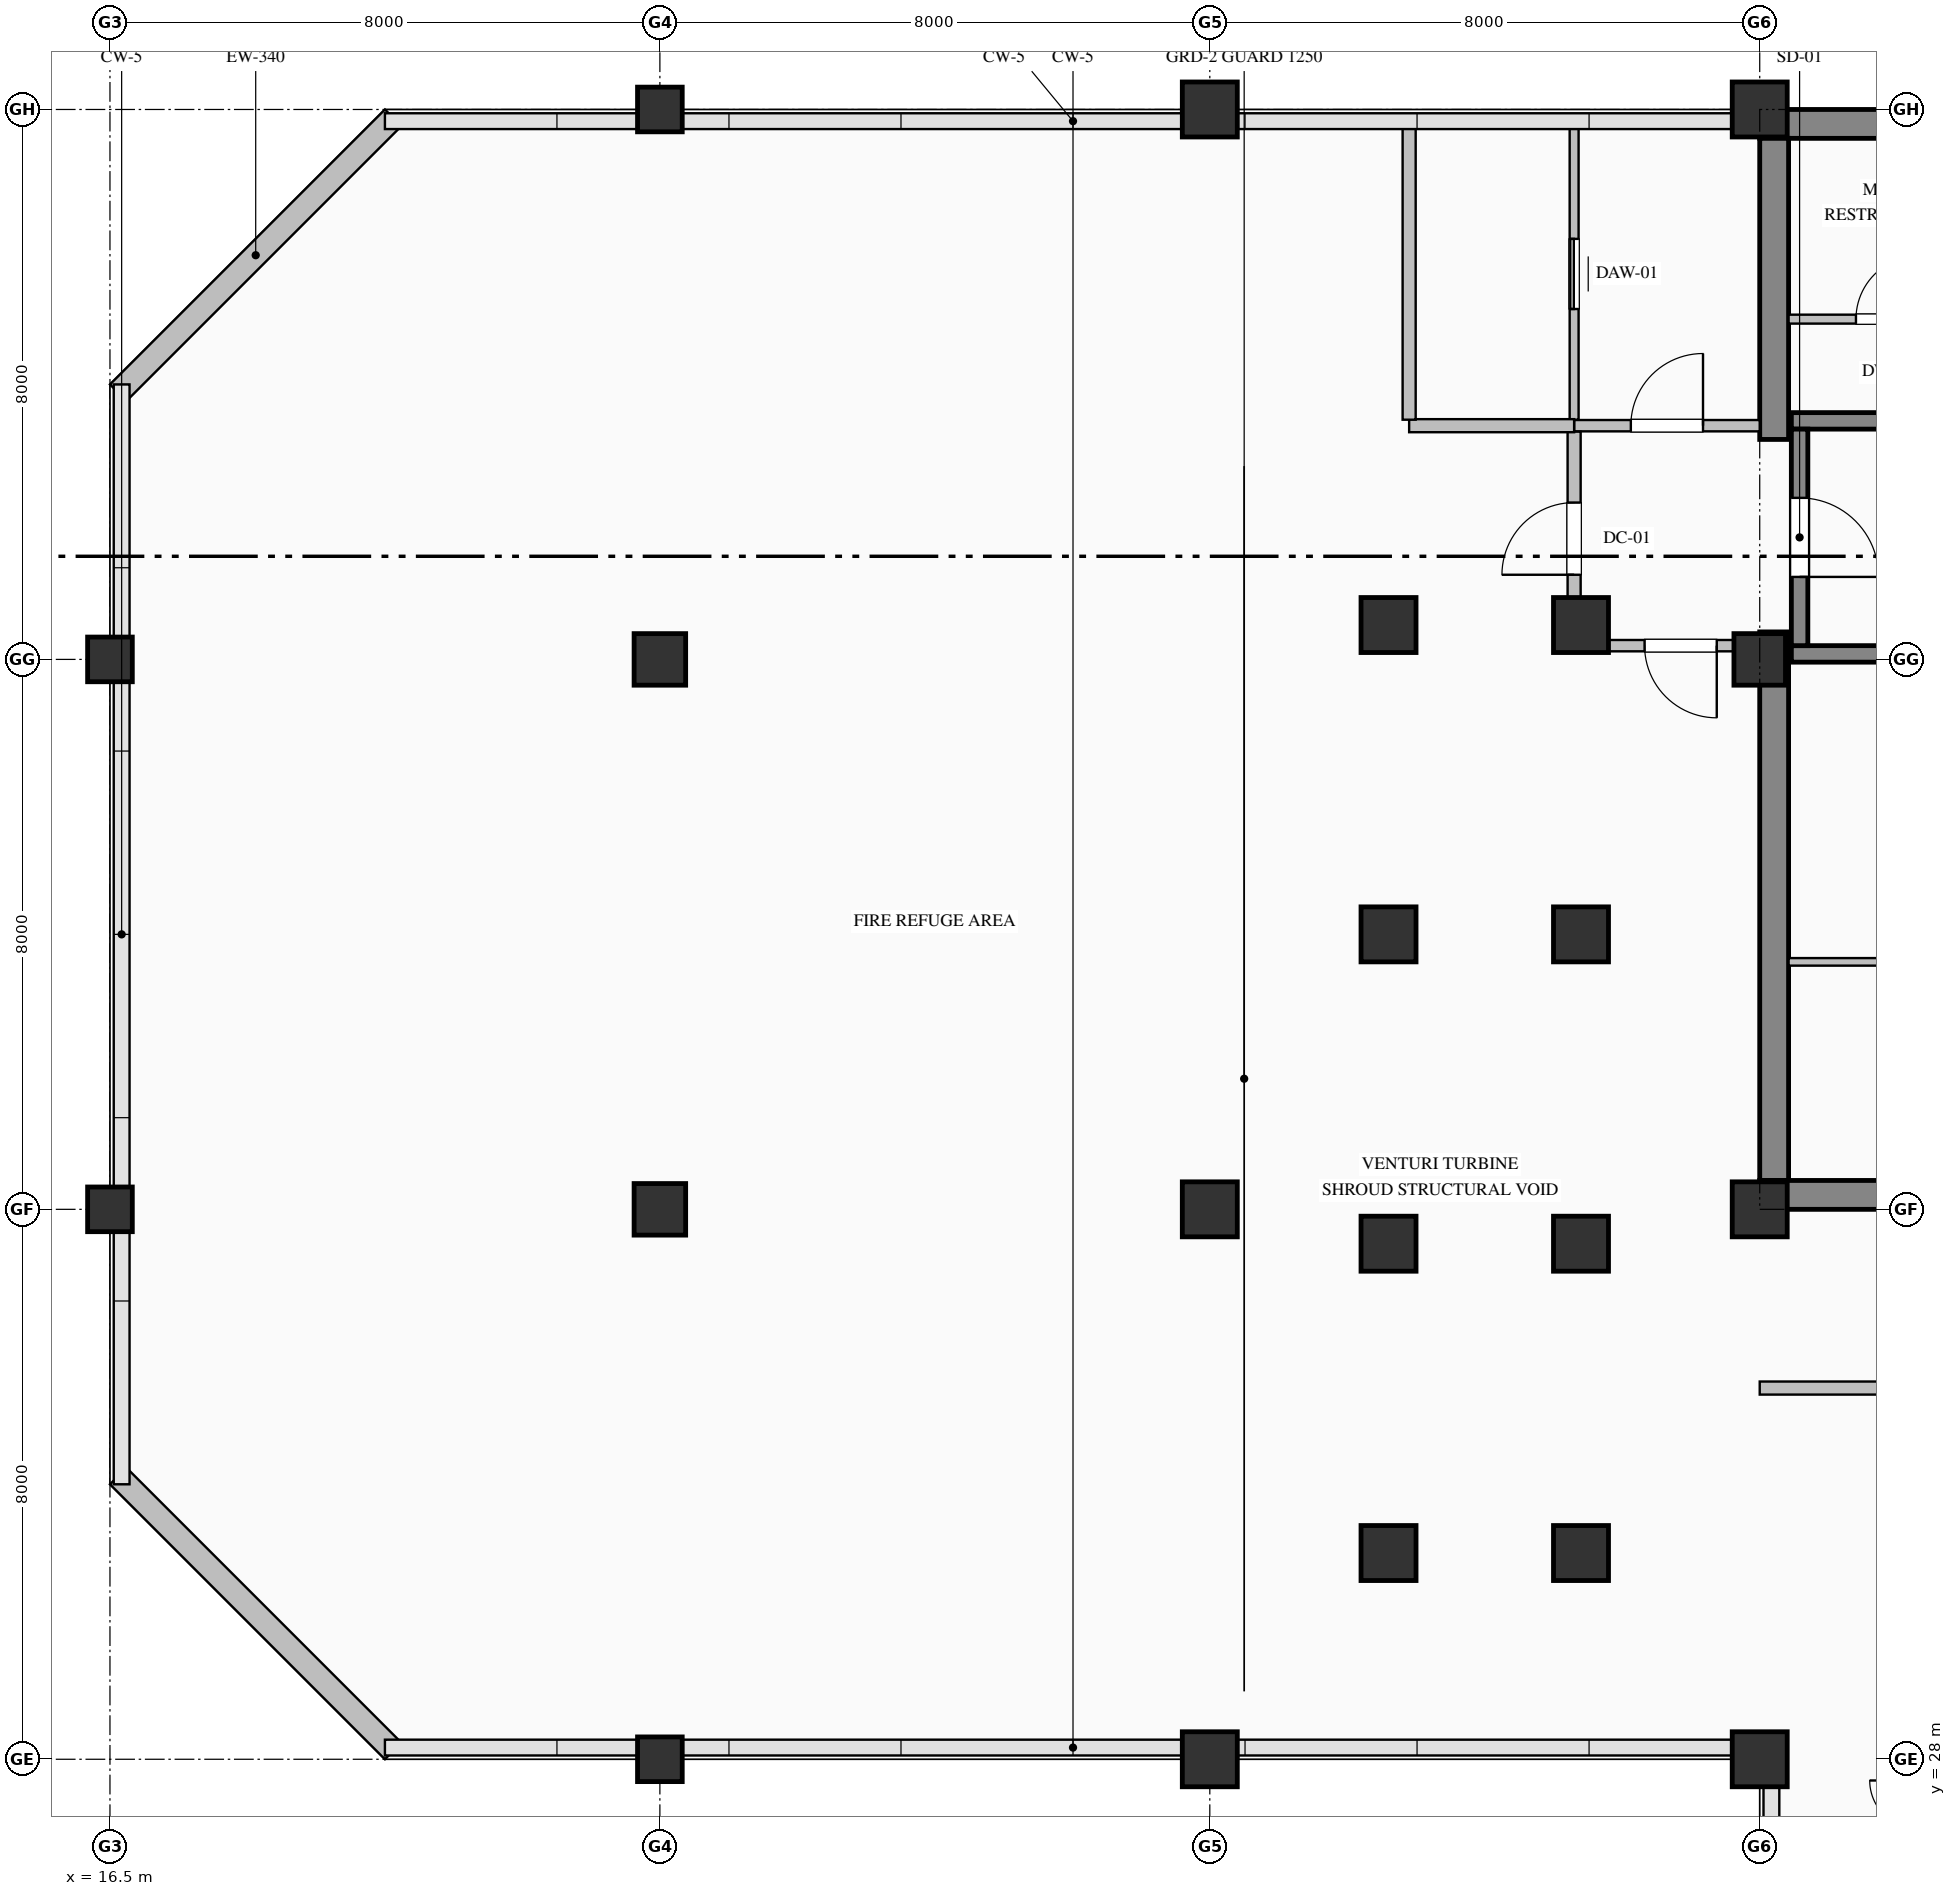
"""IFC4 building model, lengths in metres.
Left out: names, types, materials, properties, quantities, classifications, styles, units other than length and angle.
Written with IfcOpenShell. Run it as: python <this file> out.ifc"""

import sys

from ifc_helpers import new_model, si_unit, direction, frame, frame_2d, origin, origin_2d, place, context, subcontext, project, spatial, rectangle, hollow_rectangle, hollow_circle, extrude, element, fill, save


model = new_model("IFC4")
c1 = context("Model", 3, precision=1e-05, world=origin(), true_north=direction((0.0, 1.0)))
c2 = subcontext(c1, "Body", "Model", "MODEL_VIEW")
j1 = project(units=[si_unit("LENGTHUNIT", "METRE"), si_unit("PLANEANGLEUNIT", "RADIAN")], contexts=[c1])
p1 = place(None, origin())
s1 = spatial("IfcSite", under=j1, at=p1, CompositionType="ELEMENT")
p2 = place(p1, origin())
s2 = spatial("IfcBuilding", under=s1, at=p2, CompositionType="ELEMENT")
p3 = place(p2, frame((0.0, 0.0, 367.2)))
s3 = spatial("IfcBuildingStorey", under=s2, at=p3, CompositionType="ELEMENT", Elevation=367.2)
p4 = place(p3, frame((40.5, 51.79, 0.0), z_axis=(0.0, 0.0, 1.0), x_axis=(1.0, 0.0, 0.0)))
e1 = element("IfcWall", 1, at=p4, inside=s3, PredefinedType="SHEAR", context=c2, shape_type="SweptSolid", body=[
    extrude(rectangle(XDim=23.5, YDim=0.42, at=frame_2d((11.75, 0.0))), origin(), (0.0, 0.0, 1.0), 5.39),
])
p5 = place(p3, frame((40.71, 36.42, 0.0), z_axis=(0.0, 0.0, 1.0), x_axis=(0.0, 1.0, 0.0)))
e2 = element("IfcWall", 2, at=p5, inside=s3, PredefinedType="SHEAR", context=c2, shape_type="SweptSolid", body=[
    extrude(rectangle(XDim=7.98, YDim=0.42, at=frame_2d((3.99, 0.0))), origin(), (0.0, 0.0, 1.0), 5.39),
])
p6 = place(p3, frame((40.71, 47.2, 0.0), z_axis=(0.0, 0.0, 1.0), x_axis=(0.0, 1.0, 0.0)))
e3 = element("IfcWall", 3, at=p6, inside=s3, PredefinedType="SHEAR", context=c2, shape_type="SweptSolid", body=[
    extrude(rectangle(XDim=4.38, YDim=0.42, at=frame_2d((2.19, 0.0))), origin(), (0.0, 0.0, 1.0), 5.39),
])
p7 = place(p3, frame((40.5, 36.21, 0.0), z_axis=(0.0, 0.0, 1.0), x_axis=(1.0, 0.0, 0.0)))
e4 = element("IfcWall", 4, at=p7, inside=s3, PredefinedType="SHEAR", context=c2, shape_type="SweptSolid", body=[
    extrude(rectangle(XDim=9.1, YDim=0.42, at=frame_2d((4.55, 0.0))), origin(), (0.0, 0.0, 1.0), 5.39),
])
for number, where, z_axis, x_axis in (
    (5, (16.5, 36.0, 0.0), (0.0, 0.0, 1.0), (1.0, 0.0, 0.0)),
    (6, (16.5, 44.0, 0.0), (0.0, 0.0, 1.0), (1.0, 0.0, 0.0)),
    (7, (24.5, 28.0, 0.0), (0.0, 0.0, 1.0), (1.0, 0.0, 0.0)),
):
    element("IfcColumn", number, at=place(p3, frame(where, z_axis=z_axis, x_axis=x_axis)), inside=s3, PredefinedType="COLUMN", context=c2, shape_type="SweptSolid", body=[
        extrude(hollow_rectangle(XDim=0.65, YDim=0.65, WallThickness=0.028, at=origin_2d()), origin(), (0.0, 0.0, 1.0), 5.8),
    ])
for number, where, z_axis, x_axis in (
    (8, (24.5, 36.0, 0.0), (0.0, 0.0, 1.0), (1.0, 0.0, 0.0)),
    (9, (24.5, 44.0, 0.0), (0.0, 0.0, 1.0), (1.0, 0.0, 0.0)),
):
    element("IfcColumn", number, at=place(p3, frame(where, z_axis=z_axis, x_axis=x_axis)), inside=s3, PredefinedType="COLUMN", context=c2, shape_type="SweptSolid", body=[
        extrude(rectangle(XDim=0.75, YDim=0.75, at=origin_2d()), origin(), (0.0, 0.0, 1.0), 5.8),
    ])
p8 = place(p3, frame((24.5, 52.0, 0.0), z_axis=(0.0, 0.0, 1.0), x_axis=(1.0, 0.0, 0.0)))
e10 = element("IfcColumn", 10, at=p8, inside=s3, PredefinedType="COLUMN", context=c2, shape_type="SweptSolid", body=[
    extrude(hollow_rectangle(XDim=0.65, YDim=0.65, WallThickness=0.028, at=origin_2d()), origin(), (0.0, 0.0, 1.0), 5.8),
])
for number, where, z_axis, x_axis in (
    (11, (32.5, 28.0, 0.0), (0.0, 0.0, 1.0), (1.0, 0.0, 0.0)),
    (12, (32.5, 36.0, 0.0), (0.0, 0.0, 1.0), (1.0, 0.0, 0.0)),
    (13, (32.5, 52.0, 0.0), (0.0, 0.0, 1.0), (1.0, 0.0, 0.0)),
    (14, (40.5, 28.0, 0.0), (0.0, 0.0, 1.0), (1.0, 0.0, 0.0)),
    (15, (40.5, 36.0, 0.0), (0.0, 0.0, 1.0), (1.0, 0.0, 0.0)),
):
    element("IfcColumn", number, at=place(p3, frame(where, z_axis=z_axis, x_axis=x_axis)), inside=s3, PredefinedType="COLUMN", context=c2, shape_type="SweptSolid", body=[
        extrude(hollow_rectangle(XDim=0.8, YDim=0.8, WallThickness=0.032, at=origin_2d()), origin(), (0.0, 0.0, 1.0), 5.8),
    ])
p9 = place(p3, frame((40.5, 44.0, 0.0), z_axis=(0.0, 0.0, 1.0), x_axis=(1.0, 0.0, 0.0)))
e16 = element("IfcColumn", 16, at=p9, inside=s3, PredefinedType="COLUMN", context=c2, shape_type="SweptSolid", body=[
    extrude(rectangle(XDim=0.75, YDim=0.75, at=origin_2d()), origin(), (0.0, 0.0, 1.0), 5.8),
])
p10 = place(p3, frame((40.5, 52.0, 0.0), z_axis=(0.0, 0.0, 1.0), x_axis=(1.0, 0.0, 0.0)))
e17 = element("IfcColumn", 17, at=p10, inside=s3, PredefinedType="COLUMN", context=c2, shape_type="SweptSolid", body=[
    extrude(hollow_rectangle(XDim=0.8, YDim=0.8, WallThickness=0.032, at=origin_2d()), origin(), (0.0, 0.0, 1.0), 5.8),
])
for number, where, z_axis, x_axis in (
    (18, (20.62, 28.12, 0.0), (0.0, 0.0, 1.0), (-0.707, 0.707, 0.0)),
    (19, (16.62, 47.88, 0.0), (0.0, 0.0, 1.0), (0.707, 0.707, 0.0)),
):
    element("IfcWall", number, at=place(p3, frame(where, z_axis=z_axis, x_axis=x_axis)), inside=s3, PredefinedType="SOLIDWALL", context=c2, shape_type="SweptSolid", body=[
        extrude(rectangle(XDim=5.657, YDim=0.34, at=frame_2d((2.828, 0.0))), origin(), (0.0, 0.0, 1.0), 5.39),
    ])
for number, where, z_axis, x_axis in (
    (20, (35.1, 31.0, 0.0), (0.0, 0.0, 1.0), (1.0, 0.0, 0.0)),
    (21, (37.9, 31.0, 0.0), (0.0, 0.0, 1.0), (1.0, 0.0, 0.0)),
    (22, (35.1, 35.5, 0.0), (0.0, 0.0, 1.0), (1.0, 0.0, 0.0)),
    (23, (37.9, 35.5, 0.0), (0.0, 0.0, 1.0), (1.0, 0.0, 0.0)),
    (24, (35.1, 40.0, 0.0), (0.0, 0.0, 1.0), (1.0, 0.0, 0.0)),
    (25, (37.9, 40.0, 0.0), (0.0, 0.0, 1.0), (1.0, 0.0, 0.0)),
    (26, (35.1, 44.5, 0.0), (0.0, 0.0, 1.0), (1.0, 0.0, 0.0)),
    (27, (37.9, 44.5, 0.0), (0.0, 0.0, 1.0), (1.0, 0.0, 0.0)),
):
    element("IfcColumn", number, at=place(p3, frame(where, z_axis=z_axis, x_axis=x_axis)), inside=s3, PredefinedType="COLUMN", context=c2, shape_type="SweptSolid", body=[
        extrude(hollow_circle(Radius=0.4, WallThickness=0.028, at=origin_2d()), origin(), (0.0, 0.0, 1.0), 3.7),
    ])
for number, where, z_axis, x_axis in (
    (28, (40.96, 47.47, 0.0), (0.0, 0.0, 1.0), (1.0, 0.0, 0.0)),
    (29, (49.04, 44.08, 0.0), (0.0, 0.0, 1.0), (-1.0, 0.0, 0.0)),
):
    element("IfcWall", number, at=place(p3, frame(where, z_axis=z_axis, x_axis=x_axis)), inside=s3, PredefinedType="SOLIDWALL", context=c2, shape_type="SweptSolid", body=[
        extrude(rectangle(XDim=8.08, YDim=0.24, at=frame_2d((4.04, 0.0))), origin(), (0.0, 0.0, 1.0), 5.8),
    ])
p11 = place(p3, frame((41.08, 47.35, 0.0), z_axis=(0.0, 0.0, 1.0), x_axis=(0.0, -1.0, 0.0)))
e30 = element("IfcWall", 30, at=p11, inside=s3, PredefinedType="SOLIDWALL", context=c2, shape_type="SweptSolid", body=[
    extrude(rectangle(XDim=3.15, YDim=0.24, at=frame_2d((1.575, 0.0))), origin(), (0.0, 0.0, 1.0), 5.8),
])
p12 = place(p11, frame((1.0, 0.0, 0.0)))
e31 = element("IfcOpeningElement", 31, at=p12, cuts=e30, PredefinedType="OPENING", context=c2, shape_type="SweptSolid", body=[
    extrude(rectangle(XDim=1.15, YDim=2.2, at=frame_2d((0.575, 1.1))), frame((0.0, 0.13, 0.0), z_axis=(0.0, -1.0, 0.0), x_axis=(1.0, 0.0, 0.0)), (0.0, 0.0, 1.0), 0.26),
])
p13 = place(p3, frame((37.8, 47.4, 0.0), z_axis=(0.0, 0.0, 1.0), x_axis=(1.0, 0.0, 0.0)))
e32 = element("IfcWall", 32, at=p13, inside=s3, PredefinedType="PARTITIONING", context=c2, shape_type="SweptSolid", body=[
    extrude(rectangle(XDim=2.7, YDim=0.165, at=frame_2d((1.35, 0.0))), origin(), (0.0, 0.0, 1.0), 5.39),
])
p14 = place(p13, frame((0.825, 0.0, 0.0)))
e33 = element("IfcOpeningElement", 33, at=p14, cuts=e32, PredefinedType="OPENING", context=c2, shape_type="SweptSolid", body=[
    extrude(rectangle(XDim=1.05, YDim=2.15, at=frame_2d((0.525, 1.075))), frame((0.0, 0.093, 0.0), z_axis=(0.0, -1.0, 0.0), x_axis=(1.0, 0.0, 0.0)), (0.0, 0.0, 1.0), 0.185),
])
p15 = place(p3, frame((40.5, 44.2, 0.0), z_axis=(0.0, 0.0, 1.0), x_axis=(-1.0, 0.0, 0.0)))
e34 = element("IfcWall", 34, at=p15, inside=s3, PredefinedType="PARTITIONING", context=c2, shape_type="SweptSolid", body=[
    extrude(rectangle(XDim=2.3, YDim=0.165, at=frame_2d((1.15, 0.0))), origin(), (0.0, 0.0, 1.0), 5.39),
])
p16 = place(p15, frame((0.625, 0.0, 0.0)))
e35 = element("IfcOpeningElement", 35, at=p16, cuts=e34, PredefinedType="OPENING", context=c2, shape_type="SweptSolid", body=[
    extrude(rectangle(XDim=1.05, YDim=2.15, at=frame_2d((0.525, 1.075))), frame((0.0, 0.093, 0.0), z_axis=(0.0, -1.0, 0.0), x_axis=(1.0, 0.0, 0.0)), (0.0, 0.0, 1.0), 0.185),
])
p17 = place(p3, frame((37.8, 44.2, 0.0), z_axis=(0.0, 0.0, 1.0), x_axis=(0.0, 1.0, 0.0)))
e36 = element("IfcWall", 36, at=p17, inside=s3, PredefinedType="PARTITIONING", context=c2, shape_type="SweptSolid", body=[
    extrude(rectangle(XDim=3.113, YDim=0.19, at=frame_2d((1.557, 0.0))), origin(), (0.0, 0.0, 1.0), 5.39),
])
p18 = place(p17, frame((1.031, 0.0, 0.0)))
e37 = element("IfcOpeningElement", 37, at=p18, cuts=e36, PredefinedType="OPENING", context=c2, shape_type="SweptSolid", body=[
    extrude(rectangle(XDim=1.05, YDim=2.15, at=frame_2d((0.525, 1.075))), frame((0.0, 0.105, 0.0), z_axis=(0.0, -1.0, 0.0), x_axis=(1.0, 0.0, 0.0)), (0.0, 0.0, 1.0), 0.21),
])
p19 = place(p3, frame((37.8, 47.487, 0.0), z_axis=(0.0, 0.0, 1.0), x_axis=(0.0, 1.0, 0.0)))
e38 = element("IfcWall", 38, at=p19, inside=s3, PredefinedType="PARTITIONING", context=c2, shape_type="SweptSolid", body=[
    extrude(rectangle(XDim=4.241, YDim=0.13, at=frame_2d((2.121, 0.0))), origin(), (0.0, 0.0, 1.0), 5.39),
])
p20 = place(p19, frame((1.611, 0.0, 0.0)))
e39 = element("IfcOpeningElement", 39, at=p20, cuts=e38, PredefinedType="OPENING", context=c2, shape_type="SweptSolid", body=[
    extrude(rectangle(XDim=1.02, YDim=2.15, at=frame_2d((0.51, 1.075))), frame((0.0, 0.075, 0.0), z_axis=(0.0, -1.0, 0.0), x_axis=(1.0, 0.0, 0.0)), (0.0, 0.0, 1.0), 0.15),
])
p21 = place(p3, frame((37.8, 47.4, 0.0), z_axis=(0.0, 0.0, 1.0), x_axis=(-1.0, 0.0, 0.0)))
e40 = element("IfcWall", 40, at=p21, inside=s3, PredefinedType="PARTITIONING", context=c2, shape_type="SweptSolid", body=[
    extrude(rectangle(XDim=2.4, YDim=0.19, at=frame_2d((1.2, 0.0))), origin(), (0.0, 0.0, 1.0), 5.39),
])
p22 = place(p3, frame((35.4, 47.487, 0.0), z_axis=(0.0, 0.0, 1.0), x_axis=(0.0, 1.0, 0.0)))
e41 = element("IfcWall", 41, at=p22, inside=s3, PredefinedType="PARTITIONING", context=c2, shape_type="SweptSolid", body=[
    extrude(rectangle(XDim=4.241, YDim=0.19, at=frame_2d((2.121, 0.0))), origin(), (0.0, 0.0, 1.0), 5.39),
])
p23 = place(p3, frame((40.92, 48.95, 0.0), z_axis=(0.0, 0.0, 1.0), x_axis=(1.0, 0.0, 0.0)))
e42 = element("IfcWall", 42, at=p23, inside=s3, PredefinedType="PARTITIONING", context=c2, shape_type="SweptSolid", body=[
    extrude(rectangle(XDim=2.88, YDim=0.13, at=frame_2d((1.44, 0.0))), origin(), (0.0, 0.0, 1.0), 5.39),
])
p24 = place(p23, frame((0.98, 0.0, 0.0)))
e43 = element("IfcOpeningElement", 43, at=p24, cuts=e42, PredefinedType="OPENING", context=c2, shape_type="SweptSolid", body=[
    extrude(rectangle(XDim=0.92, YDim=2.15, at=frame_2d((0.46, 1.075))), frame((0.0, 0.075, 0.0), z_axis=(0.0, -1.0, 0.0), x_axis=(1.0, 0.0, 0.0)), (0.0, 0.0, 1.0), 0.15),
])
p25 = place(p3, frame((40.92, 39.6, 0.0), z_axis=(0.0, 0.0, 1.0), x_axis=(1.0, 0.0, 0.0)))
e44 = element("IfcWall", 44, at=p25, inside=s3, PredefinedType="MOVABLE", context=c2, shape_type="SweptSolid", body=[
    extrude(rectangle(XDim=8.48, YDim=0.11, at=frame_2d((4.24, 0.0))), origin(), (0.0, 0.0, 1.0), 5.39),
])
p26 = place(p3, frame((42.8, 33.4, 0.0), z_axis=(0.0, 0.0, 1.0), x_axis=(-1.0, 0.0, 0.0)))
e45 = element("IfcWall", 45, at=p26, inside=s3, PredefinedType="PARTITIONING", context=c2, shape_type="SweptSolid", body=[
    extrude(rectangle(XDim=2.3, YDim=0.19, at=frame_2d((1.15, 0.0))), origin(), (0.0, 0.0, 1.0), 5.39),
])
p27 = place(p12, origin())
e46 = element("IfcDoor", 46, at=p27, inside=s3, OperationType="SINGLE_SWING_RIGHT", PredefinedType="DOOR", context=c2, shape_type="SweptSolid", body=[
    extrude(rectangle(XDim=1.15, YDim=2.2, at=frame_2d((0.575, 1.1))), frame((0.0, 0.025, 0.0), z_axis=(0.0, -1.0, 0.0), x_axis=(1.0, 0.0, 0.0)), (0.0, 0.0, 1.0), 0.05),
])
fill(e31, e46)
p28 = place(p18, origin())
e47 = element("IfcDoor", 47, at=p28, inside=s3, OperationType="SINGLE_SWING_LEFT", PredefinedType="DOOR", context=c2, shape_type="SweptSolid", body=[
    extrude(rectangle(XDim=1.05, YDim=2.15, at=frame_2d((0.525, 1.075))), frame((0.0, 0.025, 0.0), z_axis=(0.0, -1.0, 0.0), x_axis=(1.0, 0.0, 0.0)), (0.0, 0.0, 1.0), 0.05),
])
fill(e37, e47)
p29 = place(p14, origin())
e48 = element("IfcDoor", 48, at=p29, inside=s3, OperationType="SINGLE_SWING_RIGHT", PredefinedType="DOOR", context=c2, shape_type="SweptSolid", body=[
    extrude(rectangle(XDim=1.05, YDim=2.15, at=frame_2d((0.525, 1.075))), frame((0.0, 0.025, 0.0), z_axis=(0.0, -1.0, 0.0), x_axis=(1.0, 0.0, 0.0)), (0.0, 0.0, 1.0), 0.05),
])
fill(e33, e48)
p30 = place(p16, origin())
e49 = element("IfcDoor", 49, at=p30, inside=s3, OperationType="SINGLE_SWING_LEFT", PredefinedType="DOOR", context=c2, shape_type="SweptSolid", body=[
    extrude(rectangle(XDim=1.05, YDim=2.15, at=frame_2d((0.525, 1.075))), frame((0.0, 0.025, 0.0), z_axis=(0.0, -1.0, 0.0), x_axis=(1.0, 0.0, 0.0)), (0.0, 0.0, 1.0), 0.05),
])
fill(e35, e49)
p31 = place(p20, origin())
e50 = element("IfcDoor", 50, at=p31, inside=s3, OperationType="SLIDING_TO_LEFT", PredefinedType="DOOR", context=c2, shape_type="SweptSolid", body=[
    extrude(rectangle(XDim=1.02, YDim=2.15, at=frame_2d((0.51, 1.075))), frame((0.0, 0.025, 0.0), z_axis=(0.0, -1.0, 0.0), x_axis=(1.0, 0.0, 0.0)), (0.0, 0.0, 1.0), 0.05),
])
fill(e39, e50)
p32 = place(p24, origin())
e51 = element("IfcDoor", 51, at=p32, inside=s3, OperationType="SINGLE_SWING_RIGHT", PredefinedType="DOOR", context=c2, shape_type="SweptSolid", body=[
    extrude(rectangle(XDim=0.92, YDim=2.15, at=frame_2d((0.46, 1.075))), frame((0.0, 0.025, 0.0), z_axis=(0.0, -1.0, 0.0), x_axis=(1.0, 0.0, 0.0)), (0.0, 0.0, 1.0), 0.05),
])
fill(e43, e51)
save(model, sys.argv[1])
